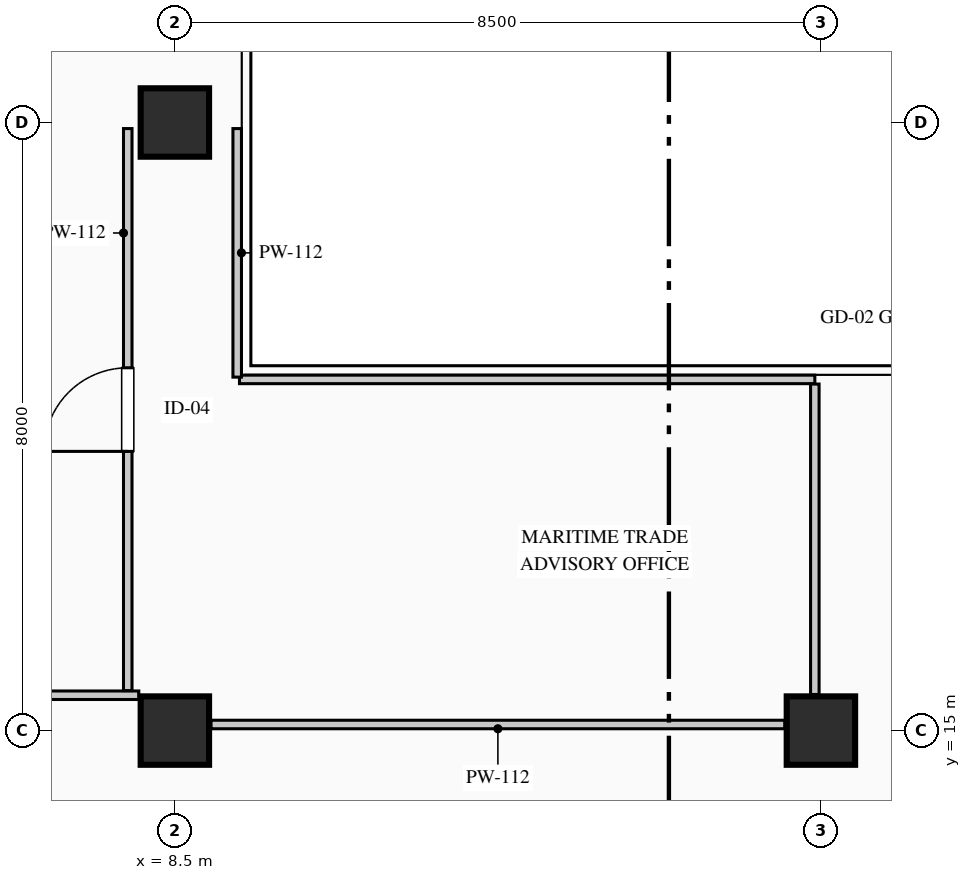
"""IFC4 building model, lengths in metres.
Left out: names, types, materials, properties, quantities, classifications, styles, units other than length and angle.
Written with IfcOpenShell. Run it as: python <this file> out.ifc"""

import sys

from ifc_helpers import new_model, si_unit, direction, frame, frame_2d, origin, origin_2d, place, context, subcontext, project, spatial, rectangle, extrude, element, fill, save


model = new_model("IFC4")
c1 = context("Model", 3, precision=1e-05, world=origin(), true_north=direction((0.0, 1.0)))
c2 = subcontext(c1, "Body", "Model", "MODEL_VIEW")
j1 = project(units=[si_unit("LENGTHUNIT", "METRE"), si_unit("PLANEANGLEUNIT", "RADIAN")], contexts=[c1])
p1 = place(None, origin())
s1 = spatial("IfcSite", under=j1, at=p1, CompositionType="ELEMENT")
p2 = place(p1, origin())
s2 = spatial("IfcBuilding", under=s1, at=p2, CompositionType="ELEMENT")
p3 = place(p2, frame((0.0, 0.0, 187.7)))
s3 = spatial("IfcBuildingStorey", under=s2, at=p3, CompositionType="ELEMENT", Elevation=187.7)
for number, where, z_axis, x_axis in (
    (1, (8.5, 15.0, 0.0), (0.0, 0.0, 1.0), (1.0, 0.0, 0.0)),
    (2, (8.5, 23.0, 0.0), (0.0, 0.0, 1.0), (1.0, 0.0, 0.0)),
    (3, (17.0, 15.0, 0.0), (0.0, 0.0, 1.0), (1.0, 0.0, 0.0)),
):
    element("IfcColumn", number, at=place(p3, frame(where, z_axis=z_axis, x_axis=x_axis)), inside=s3, PredefinedType="COLUMN", context=c2, shape_type="SweptSolid", body=[
        extrude(rectangle(XDim=0.9, YDim=0.9, at=origin_2d()), origin(), (0.0, 0.0, 1.0), 3.95),
    ])
p4 = place(p3, frame((7.469, 4.63, 0.0), z_axis=(0.0, 0.0, 1.0), x_axis=(-0.123515300309, 0.992342667928, 0.0)))
e4 = element("IfcWall", 4, at=p4, inside=s3, PredefinedType="STANDARD", context=c2, shape_type="SweptSolid", body=[
    extrude(rectangle(XDim=37.024, YDim=0.26, at=frame_2d((18.512, 0.0))), origin(), (0.0, 0.0, 1.0), 3.7),
])
p5 = place(p4, frame((11.978, 0.0, 0.9)))
e5 = element("IfcOpeningElement", 5, at=p5, cuts=e4, PredefinedType="OPENING", context=c2, shape_type="SweptSolid", body=[
    extrude(rectangle(XDim=2.7, YDim=2.1, at=frame_2d((1.35, 1.05))), frame((0.0, 0.14, 0.0), z_axis=(0.0, -1.0, 0.0), x_axis=(1.0, 0.0, 0.0)), (0.0, 0.0, 1.0), 0.28),
])
p6 = place(p3, frame((9.35, 19.62, 0.0), z_axis=(0.0, 0.0, 1.0), x_axis=(1.0, 0.0, 0.0)))
e6 = element("IfcWall", 6, at=p6, inside=s3, PredefinedType="PARTITIONING", context=c2, shape_type="SweptSolid", body=[
    extrude(rectangle(XDim=7.57, YDim=0.112, at=frame_2d((3.785, 0.0))), origin(), (0.0, 0.0, 1.0), 3.7),
])
p7 = place(p3, frame((16.92, 19.559, 0.0), z_axis=(0.0, 0.0, 1.0), x_axis=(0.0, -1.0, 0.0)))
e7 = element("IfcWall", 7, at=p7, inside=s3, PredefinedType="PARTITIONING", context=c2, shape_type="SweptSolid", body=[
    extrude(rectangle(XDim=4.084, YDim=0.112, at=frame_2d((2.042, 0.0))), origin(), (0.0, 0.0, 1.0), 3.7),
])
p8 = place(p3, frame((16.525, 15.08, 0.0), z_axis=(0.0, 0.0, 1.0), x_axis=(-1.0, 0.0, 0.0)))
e8 = element("IfcWall", 8, at=p8, inside=s3, PredefinedType="PARTITIONING", context=c2, shape_type="SweptSolid", body=[
    extrude(rectangle(XDim=7.55, YDim=0.112, at=frame_2d((3.775, 0.0))), origin(), (0.0, 0.0, 1.0), 3.085),
])
p9 = place(p3, frame((8.025, 15.465, 0.0), z_axis=(0.0, 0.0, 1.0), x_axis=(-1.0, 0.0, 0.0)))
e9 = element("IfcWall", 9, at=p9, inside=s3, PredefinedType="PARTITIONING", context=c2, shape_type="SweptSolid", body=[
    extrude(rectangle(XDim=1.769, YDim=0.112, at=frame_2d((0.884, 0.0))), origin(), (0.0, 0.0, 1.0), 3.7),
])
p10 = place(p3, frame((7.88, 15.526, 0.0), z_axis=(0.0, 0.0, 1.0), x_axis=(0.0, 1.0, 0.0)))
e10 = element("IfcWall", 10, at=p10, inside=s3, PredefinedType="PARTITIONING", context=c2, shape_type="SweptSolid", body=[
    extrude(rectangle(XDim=7.394, YDim=0.112, at=frame_2d((3.697, 0.0))), origin(), (0.0, 0.0, 1.0), 3.7),
])
p11 = place(p10, frame((3.147, 0.0, 0.0)))
e11 = element("IfcOpeningElement", 11, at=p11, cuts=e10, PredefinedType="OPENING", context=c2, shape_type="SweptSolid", body=[
    extrude(rectangle(XDim=1.1, YDim=2.2, at=frame_2d((0.55, 1.1))), frame((0.0, 0.066, 0.0), z_axis=(0.0, -1.0, 0.0), x_axis=(1.0, 0.0, 0.0)), (0.0, 0.0, 1.0), 0.132),
])
p12 = place(p3, frame((9.32, 22.92, 0.0), z_axis=(0.0, 0.0, 1.0), x_axis=(0.0, -1.0, 0.0)))
e12 = element("IfcWall", 12, at=p12, inside=s3, PredefinedType="PARTITIONING", context=c2, shape_type="SweptSolid", body=[
    extrude(rectangle(XDim=3.27, YDim=0.112, at=frame_2d((1.635, 0.0))), origin(), (0.0, 0.0, 1.0), 3.385),
])
p13 = place(p11, origin())
e13 = element("IfcDoor", 13, at=p13, inside=s3, OperationType="SINGLE_SWING_LEFT", PredefinedType="DOOR", context=c2, shape_type="SweptSolid", body=[
    extrude(rectangle(XDim=1.1, YDim=2.2, at=frame_2d((0.55, 1.1))), frame((0.0, 0.025, 0.0), z_axis=(0.0, -1.0, 0.0), x_axis=(1.0, 0.0, 0.0)), (0.0, 0.0, 1.0), 0.05),
])
fill(e11, e13)
save(model, sys.argv[1])
